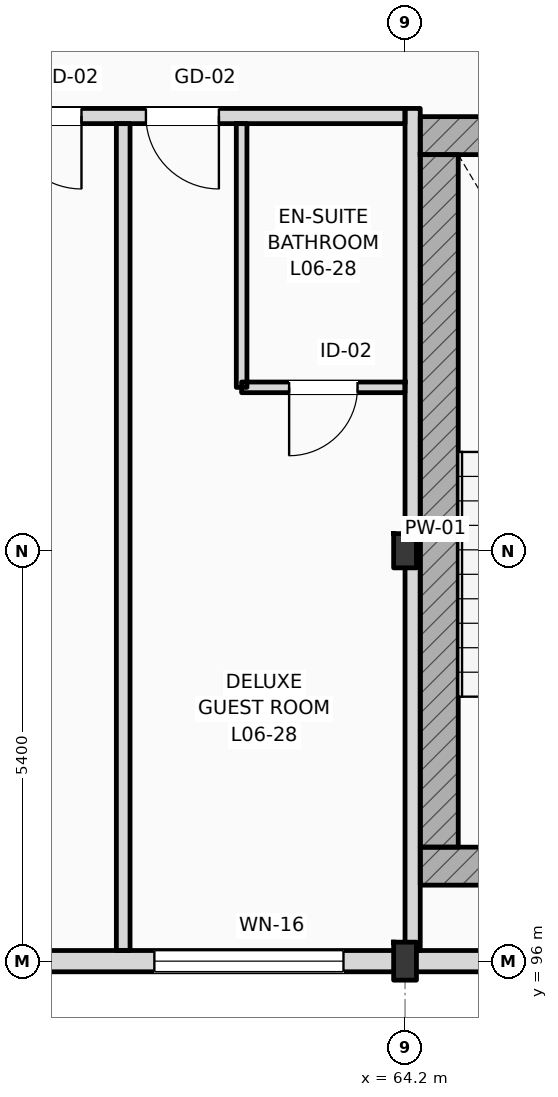
"""IFC4 building model, lengths in metres.
Left out: names, types, materials, properties, quantities, classifications, styles, units other than length and angle.
Written with IfcOpenShell. Run it as: python <this file> out.ifc"""

import sys

from ifc_helpers import new_model, si_unit, direction, frame, frame_2d, origin, origin_2d, place, context, subcontext, project, spatial, rectangle, i_section, extrude, element, fill, save


model = new_model("IFC4")
c1 = context("Model", 3, precision=1e-05, world=origin(), true_north=direction((0.0, 1.0)))
c2 = subcontext(c1, "Body", "Model", "MODEL_VIEW")
j1 = project(units=[si_unit("LENGTHUNIT", "METRE"), si_unit("PLANEANGLEUNIT", "RADIAN")], contexts=[c1])
p1 = place(None, origin())
s1 = spatial("IfcSite", under=j1, at=p1, CompositionType="ELEMENT")
p2 = place(p1, origin())
s2 = spatial("IfcBuilding", under=s1, at=p2, CompositionType="ELEMENT")
p3 = place(p2, frame((0.0, 0.0, 28.2)))
s3 = spatial("IfcBuildingStorey", under=s2, at=p3, CompositionType="ELEMENT", Elevation=28.2)
p4 = place(p3, frame((64.2, 96.0, 0.0), z_axis=(0.0, 0.0, 1.0), x_axis=(1.0, 0.0, 0.0)))
e1 = element("IfcColumn", 1, at=p4, inside=s3, PredefinedType="COLUMN", context=c2, shape_type="SweptSolid", body=[
    extrude(i_section(OverallWidth=0.3, OverallDepth=0.5, WebThickness=0.014, FlangeThickness=0.028, FilletRadius=0.027, at=origin_2d()), origin(), (0.0, 0.0, 1.0), 3.6),
])
p5 = place(p3, frame((64.2, 101.4, 0.0), z_axis=(0.0, 0.0, 1.0), x_axis=(1.0, 0.0, 0.0)))
e2 = element("IfcColumn", 2, at=p5, inside=s3, PredefinedType="COLUMN", context=c2, shape_type="SweptSolid", body=[
    extrude(i_section(OverallWidth=0.3, OverallDepth=0.45, WebThickness=0.014, FlangeThickness=0.026, FilletRadius=0.027, at=origin_2d()), origin(), (0.0, 0.0, 1.0), 3.6),
])
for number, where, z_axis, x_axis in (
    (3, (64.4, 106.862, 0.0), (0.0, 0.0, 1.0), (1.0, 0.0, 0.0)),
    (4, (64.4, 97.25, 0.0), (0.0, 0.0, 1.0), (1.0, 0.0, 0.0)),
):
    element("IfcWall", number, at=place(p3, frame(where, z_axis=z_axis, x_axis=x_axis)), inside=s3, PredefinedType="SHEAR", context=c2, shape_type="SweptSolid", body=[
        extrude(rectangle(XDim=5.16, YDim=0.5, at=frame_2d((2.58, 0.0))), origin(), (0.0, 0.0, 1.0), 3.6),
    ])
p6 = place(p3, frame((64.65, 97.5, 0.0), z_axis=(0.0, 0.0, 1.0), x_axis=(0.0, 1.0, 0.0)))
e5 = element("IfcWall", 5, at=p6, inside=s3, PredefinedType="SHEAR", context=c2, shape_type="SweptSolid", body=[
    extrude(rectangle(XDim=9.112, YDim=0.5, at=frame_2d((4.556, 0.0))), origin(), (0.0, 0.0, 1.0), 3.6),
])
p7 = place(p3, frame((25.2, 96.0, 0.0), z_axis=(0.0, 0.0, 1.0), x_axis=(1.0, 0.0, 0.0)))
e6 = element("IfcWall", 6, at=p7, inside=s3, PredefinedType="STANDARD", context=c2, shape_type="SweptSolid", body=[
    extrude(rectangle(XDim=94.8, YDim=0.28, at=frame_2d((47.4, 0.0))), origin(), (0.0, 0.0, 1.0), 2.8),
])
p8 = place(p7, frame((16.454, 0.0, 0.9)))
e7 = element("IfcOpeningElement", 7, at=p8, cuts=e6, PredefinedType="OPENING", context=c2, shape_type="SweptSolid", body=[
    extrude(rectangle(XDim=2.7, YDim=1.72, at=frame_2d((1.35, 0.86))), frame((0.0, 0.15, 0.0), z_axis=(0.0, -1.0, 0.0), x_axis=(1.0, 0.0, 0.0)), (0.0, 0.0, 1.0), 0.3),
])
p9 = place(p7, frame((20.068, 0.0, 0.9)))
e8 = element("IfcOpeningElement", 8, at=p9, cuts=e6, PredefinedType="OPENING", context=c2, shape_type="SweptSolid", body=[
    extrude(rectangle(XDim=2.389, YDim=1.72, at=frame_2d((1.194, 0.86))), frame((0.0, 0.15, 0.0), z_axis=(0.0, -1.0, 0.0), x_axis=(1.0, 0.0, 0.0)), (0.0, 0.0, 1.0), 0.3),
])
p10 = place(p7, frame((24.277, 0.0, 0.9)))
e9 = element("IfcOpeningElement", 9, at=p10, cuts=e6, PredefinedType="OPENING", context=c2, shape_type="SweptSolid", body=[
    extrude(rectangle(XDim=1.8, YDim=1.72, at=frame_2d((0.9, 0.86))), frame((0.0, 0.15, 0.0), z_axis=(0.0, -1.0, 0.0), x_axis=(1.0, 0.0, 0.0)), (0.0, 0.0, 1.0), 0.3),
])
p11 = place(p7, frame((27.885, 0.0, 0.9)))
e10 = element("IfcOpeningElement", 10, at=p11, cuts=e6, PredefinedType="OPENING", context=c2, shape_type="SweptSolid", body=[
    extrude(rectangle(XDim=2.388, YDim=1.72, at=frame_2d((1.194, 0.86))), frame((0.0, 0.15, 0.0), z_axis=(0.0, -1.0, 0.0), x_axis=(1.0, 0.0, 0.0)), (0.0, 0.0, 1.0), 0.3),
])
p12 = place(p7, frame((32.093, 0.0, 0.9)))
e11 = element("IfcOpeningElement", 11, at=p12, cuts=e6, PredefinedType="OPENING", context=c2, shape_type="SweptSolid", body=[
    extrude(rectangle(XDim=1.8, YDim=1.72, at=frame_2d((0.9, 0.86))), frame((0.0, 0.15, 0.0), z_axis=(0.0, -1.0, 0.0), x_axis=(1.0, 0.0, 0.0)), (0.0, 0.0, 1.0), 0.3),
])
p13 = place(p7, frame((35.702, 0.0, 0.9)))
e12 = element("IfcOpeningElement", 12, at=p13, cuts=e6, PredefinedType="OPENING", context=c2, shape_type="SweptSolid", body=[
    extrude(rectangle(XDim=2.488, YDim=1.72, at=frame_2d((1.244, 0.86))), frame((0.0, 0.15, 0.0), z_axis=(0.0, -1.0, 0.0), x_axis=(1.0, 0.0, 0.0)), (0.0, 0.0, 1.0), 0.3),
])
p14 = place(p7, frame((55.56, 0.0, 0.9)))
e13 = element("IfcOpeningElement", 13, at=p14, cuts=e6, PredefinedType="OPENING", context=c2, shape_type="SweptSolid", body=[
    extrude(rectangle(XDim=1.8, YDim=1.72, at=frame_2d((0.9, 0.86))), frame((0.0, 0.15, 0.0), z_axis=(0.0, -1.0, 0.0), x_axis=(1.0, 0.0, 0.0)), (0.0, 0.0, 1.0), 0.3),
])
p15 = place(p7, frame((58.985, 0.0, 0.9)))
e14 = element("IfcOpeningElement", 14, at=p15, cuts=e6, PredefinedType="OPENING", context=c2, shape_type="SweptSolid", body=[
    extrude(rectangle(XDim=1.8, YDim=1.72, at=frame_2d((0.9, 0.86))), frame((0.0, 0.15, 0.0), z_axis=(0.0, -1.0, 0.0), x_axis=(1.0, 0.0, 0.0)), (0.0, 0.0, 1.0), 0.3),
])
p16 = place(p7, frame((63.21, 0.0, 0.9)))
e15 = element("IfcOpeningElement", 15, at=p16, cuts=e6, PredefinedType="OPENING", context=c2, shape_type="SweptSolid", body=[
    extrude(rectangle(XDim=2.525, YDim=1.72, at=frame_2d((1.262, 0.86))), frame((0.0, 0.15, 0.0), z_axis=(0.0, -1.0, 0.0), x_axis=(1.0, 0.0, 0.0)), (0.0, 0.0, 1.0), 0.3),
])
p17 = place(p7, frame((66.955, 0.0, 0.9)))
e16 = element("IfcOpeningElement", 16, at=p17, cuts=e6, PredefinedType="OPENING", context=c2, shape_type="SweptSolid", body=[
    extrude(rectangle(XDim=1.8, YDim=1.72, at=frame_2d((0.9, 0.86))), frame((0.0, 0.15, 0.0), z_axis=(0.0, -1.0, 0.0), x_axis=(1.0, 0.0, 0.0)), (0.0, 0.0, 1.0), 0.3),
])
p18 = place(p7, frame((71.892, 0.0, 0.9)))
e17 = element("IfcOpeningElement", 17, at=p18, cuts=e6, PredefinedType="OPENING", context=c2, shape_type="SweptSolid", body=[
    extrude(rectangle(XDim=1.1, YDim=1.5, at=frame_2d((0.55, 0.75))), frame((0.0, 0.15, 0.0), z_axis=(0.0, -1.0, 0.0), x_axis=(1.0, 0.0, 0.0)), (0.0, 0.0, 1.0), 0.3),
])
p19 = place(p7, frame((75.802, 0.0, 0.9)))
e18 = element("IfcOpeningElement", 18, at=p19, cuts=e6, PredefinedType="OPENING", context=c2, shape_type="SweptSolid", body=[
    extrude(rectangle(XDim=1.25, YDim=1.6, at=frame_2d((0.625, 0.8))), frame((0.0, 0.15, 0.0), z_axis=(0.0, -1.0, 0.0), x_axis=(1.0, 0.0, 0.0)), (0.0, 0.0, 1.0), 0.3),
])
p20 = place(p7, frame((79.712, 0.0, 0.9)))
e19 = element("IfcOpeningElement", 19, at=p20, cuts=e6, PredefinedType="OPENING", context=c2, shape_type="SweptSolid", body=[
    extrude(rectangle(XDim=1.4, YDim=1.7, at=frame_2d((0.7, 0.85))), frame((0.0, 0.15, 0.0), z_axis=(0.0, -1.0, 0.0), x_axis=(1.0, 0.0, 0.0)), (0.0, 0.0, 1.0), 0.3),
])
p21 = place(p7, frame((83.597, 0.0, 0.9)))
e20 = element("IfcOpeningElement", 20, at=p21, cuts=e6, PredefinedType="OPENING", context=c2, shape_type="SweptSolid", body=[
    extrude(rectangle(XDim=1.6, YDim=1.72, at=frame_2d((0.8, 0.86))), frame((0.0, 0.15, 0.0), z_axis=(0.0, -1.0, 0.0), x_axis=(1.0, 0.0, 0.0)), (0.0, 0.0, 1.0), 0.3),
])
p22 = place(p7, frame((87.507, 0.0, 0.9)))
e21 = element("IfcOpeningElement", 21, at=p22, cuts=e6, PredefinedType="OPENING", context=c2, shape_type="SweptSolid", body=[
    extrude(rectangle(XDim=1.75, YDim=1.72, at=frame_2d((0.875, 0.86))), frame((0.0, 0.15, 0.0), z_axis=(0.0, -1.0, 0.0), x_axis=(1.0, 0.0, 0.0)), (0.0, 0.0, 1.0), 0.3),
])
p23 = place(p7, frame((91.328, 0.0, 0.9)))
e22 = element("IfcOpeningElement", 22, at=p23, cuts=e6, PredefinedType="OPENING", context=c2, shape_type="SweptSolid", body=[
    extrude(rectangle(XDim=2.0, YDim=1.72, at=frame_2d((1.0, 0.86))), frame((0.0, 0.15, 0.0), z_axis=(0.0, -1.0, 0.0), x_axis=(1.0, 0.0, 0.0)), (0.0, 0.0, 1.0), 0.3),
])
p24 = place(p3, frame((40.76, 107.12, 0.0), z_axis=(0.0, 0.0, 1.0), x_axis=(1.0, 0.0, 0.0)))
e23 = element("IfcWall", 23, at=p24, inside=s3, PredefinedType="PARTITIONING", context=c2, shape_type="SweptSolid", body=[
    extrude(rectangle(XDim=23.44, YDim=0.2, at=frame_2d((11.72, 0.0))), origin(), (0.0, 0.0, 1.0), 3.36),
])
p25 = place(p24, frame((2.639, 0.0, 0.0)))
e24 = element("IfcOpeningElement", 24, at=p25, cuts=e23, PredefinedType="OPENING", context=c2, shape_type="SweptSolid", body=[
    extrude(rectangle(XDim=0.96, YDim=2.2, at=frame_2d((0.48, 1.1))), frame((0.0, 0.11, 0.0), z_axis=(0.0, -1.0, 0.0), x_axis=(1.0, 0.0, 0.0)), (0.0, 0.0, 1.0), 0.22),
])
p26 = place(p24, frame((4.348, 0.0, 0.0)))
e25 = element("IfcOpeningElement", 25, at=p26, cuts=e23, PredefinedType="OPENING", context=c2, shape_type="SweptSolid", body=[
    extrude(rectangle(XDim=0.96, YDim=2.2, at=frame_2d((0.48, 1.1))), frame((0.0, 0.11, 0.0), z_axis=(0.0, -1.0, 0.0), x_axis=(1.0, 0.0, 0.0)), (0.0, 0.0, 1.0), 0.22),
])
p27 = place(p24, frame((10.406, 0.0, 0.0)))
e26 = element("IfcOpeningElement", 26, at=p27, cuts=e23, PredefinedType="OPENING", context=c2, shape_type="SweptSolid", body=[
    extrude(rectangle(XDim=0.96, YDim=2.2, at=frame_2d((0.48, 1.1))), frame((0.0, 0.11, 0.0), z_axis=(0.0, -1.0, 0.0), x_axis=(1.0, 0.0, 0.0)), (0.0, 0.0, 1.0), 0.22),
])
p28 = place(p24, frame((12.164, 0.0, 0.0)))
e27 = element("IfcOpeningElement", 27, at=p28, cuts=e23, PredefinedType="OPENING", context=c2, shape_type="SweptSolid", body=[
    extrude(rectangle(XDim=0.96, YDim=2.2, at=frame_2d((0.48, 1.1))), frame((0.0, 0.11, 0.0), z_axis=(0.0, -1.0, 0.0), x_axis=(1.0, 0.0, 0.0)), (0.0, 0.0, 1.0), 0.22),
])
p29 = place(p24, frame((18.223, 0.0, 0.0)))
e28 = element("IfcOpeningElement", 28, at=p29, cuts=e23, PredefinedType="OPENING", context=c2, shape_type="SweptSolid", body=[
    extrude(rectangle(XDim=0.96, YDim=2.2, at=frame_2d((0.48, 1.1))), frame((0.0, 0.11, 0.0), z_axis=(0.0, -1.0, 0.0), x_axis=(1.0, 0.0, 0.0)), (0.0, 0.0, 1.0), 0.22),
])
p30 = place(p24, frame((20.031, 0.0, 0.0)))
e29 = element("IfcOpeningElement", 29, at=p30, cuts=e23, PredefinedType="OPENING", context=c2, shape_type="SweptSolid", body=[
    extrude(rectangle(XDim=0.96, YDim=2.2, at=frame_2d((0.48, 1.1))), frame((0.0, 0.11, 0.0), z_axis=(0.0, -1.0, 0.0), x_axis=(1.0, 0.0, 0.0)), (0.0, 0.0, 1.0), 0.22),
])
p31 = place(p3, frame((64.3, 96.14, 0.0), z_axis=(0.0, 0.0, 1.0), x_axis=(0.0, 1.0, 0.0)))
e30 = element("IfcWall", 30, at=p31, inside=s3, PredefinedType="PARTITIONING", context=c2, shape_type="SweptSolid", body=[
    extrude(rectangle(XDim=11.08, YDim=0.2, at=frame_2d((5.54, 0.0))), origin(), (0.0, 0.0, 1.0), 2.99),
])
p32 = place(p3, frame((60.492, 96.14, 0.0), z_axis=(0.0, 0.0, 1.0), x_axis=(0.0, 1.0, 0.0)))
e31 = element("IfcWall", 31, at=p32, inside=s3, PredefinedType="PARTITIONING", context=c2, shape_type="SweptSolid", body=[
    extrude(rectangle(XDim=10.88, YDim=0.18, at=frame_2d((5.44, 0.0))), origin(), (0.0, 0.0, 1.0), 3.36),
])
p33 = place(p3, frame((62.05, 103.55, 0.0), z_axis=(0.0, 0.0, 1.0), x_axis=(0.0, 1.0, 0.0)))
e32 = element("IfcWall", 32, at=p33, inside=s3, PredefinedType="PARTITIONING", context=c2, shape_type="SweptSolid", body=[
    extrude(rectangle(XDim=3.47, YDim=0.14, at=frame_2d((1.735, 0.0))), origin(), (0.0, 0.0, 1.0), 3.36),
])
p34 = place(p3, frame((62.05, 103.55, 0.0), z_axis=(0.0, 0.0, 1.0), x_axis=(1.0, 0.0, 0.0)))
e33 = element("IfcWall", 33, at=p34, inside=s3, PredefinedType="PARTITIONING", context=c2, shape_type="SweptSolid", body=[
    extrude(rectangle(XDim=2.15, YDim=0.14, at=frame_2d((1.075, 0.0))), origin(), (0.0, 0.0, 1.0), 3.36),
])
p35 = place(p34, frame((0.625, 0.0, 0.0)))
e34 = element("IfcOpeningElement", 34, at=p35, cuts=e33, PredefinedType="OPENING", context=c2, shape_type="SweptSolid", body=[
    extrude(rectangle(XDim=0.9, YDim=2.1, at=frame_2d((0.45, 1.05))), frame((0.0, 0.08, 0.0), z_axis=(0.0, -1.0, 0.0), x_axis=(1.0, 0.0, 0.0)), (0.0, 0.0, 1.0), 0.16),
])
p36 = place(p13, origin())
e35 = element("IfcWindow", 35, at=p36, inside=s3, PartitioningType="DOUBLE_PANEL_VERTICAL", PredefinedType="WINDOW", context=c2, shape_type="SweptSolid", body=[
    extrude(rectangle(XDim=2.488, YDim=1.72, at=frame_2d((1.244, 0.86))), frame((0.0, 0.03, 0.0), z_axis=(0.0, -1.0, 0.0), x_axis=(1.0, 0.0, 0.0)), (0.0, 0.0, 1.0), 0.06),
])
fill(e12, e35)
p37 = place(p29, frame((0.96, 0.0, 0.0), z_axis=(0.0, 0.0, 1.0), x_axis=(-1.0, 0.0, 0.0)))
e36 = element("IfcDoor", 36, at=p37, inside=s3, OperationType="SINGLE_SWING_RIGHT", PredefinedType="DOOR", context=c2, shape_type="SweptSolid", body=[
    extrude(rectangle(XDim=0.96, YDim=2.2, at=frame_2d((0.48, 1.1))), frame((0.0, 0.025, 0.0), z_axis=(0.0, -1.0, 0.0), x_axis=(1.0, 0.0, 0.0)), (0.0, 0.0, 1.0), 0.05),
])
fill(e28, e36)
p38 = place(p30, frame((0.96, 0.0, 0.0), z_axis=(0.0, 0.0, 1.0), x_axis=(-1.0, 0.0, 0.0)))
e37 = element("IfcDoor", 37, at=p38, inside=s3, OperationType="SINGLE_SWING_RIGHT", PredefinedType="DOOR", context=c2, shape_type="SweptSolid", body=[
    extrude(rectangle(XDim=0.96, YDim=2.2, at=frame_2d((0.48, 1.1))), frame((0.0, 0.025, 0.0), z_axis=(0.0, -1.0, 0.0), x_axis=(1.0, 0.0, 0.0)), (0.0, 0.0, 1.0), 0.05),
])
fill(e29, e37)
p39 = place(p35, frame((0.9, 0.0, 0.0), z_axis=(0.0, 0.0, 1.0), x_axis=(-1.0, 0.0, 0.0)))
e38 = element("IfcDoor", 38, at=p39, inside=s3, OperationType="SINGLE_SWING_LEFT", PredefinedType="DOOR", context=c2, shape_type="SweptSolid", body=[
    extrude(rectangle(XDim=0.9, YDim=2.1, at=frame_2d((0.45, 1.05))), frame((0.0, 0.025, 0.0), z_axis=(0.0, -1.0, 0.0), x_axis=(1.0, 0.0, 0.0)), (0.0, 0.0, 1.0), 0.05),
])
fill(e34, e38)
save(model, sys.argv[1])
